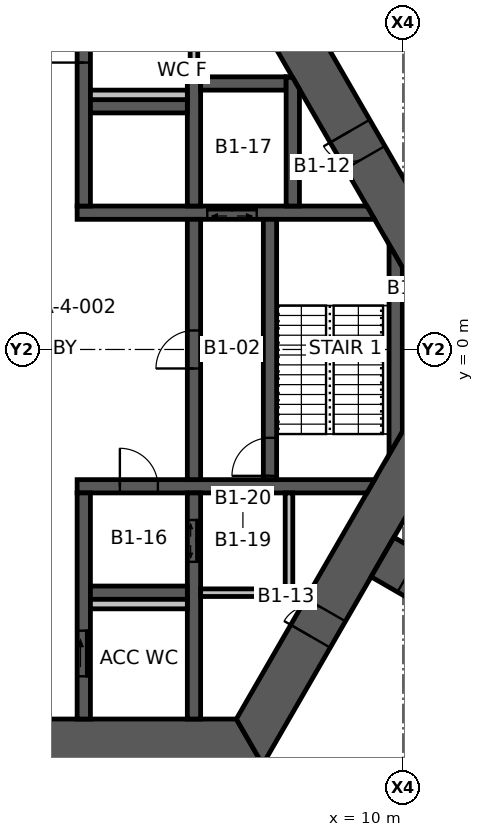
"""IFC4 building model, lengths in metres.
Left out: names, types, materials, properties, quantities, classifications, styles, units other than length and angle.
Written with IfcOpenShell. Run it as: python <this file> out.ifc"""

import sys

from ifc_helpers import new_model, si_unit, direction, frame, frame_2d, origin, place, context, subcontext, project, spatial, polyline, rectangle, outline, extrude, element, fill, save


model = new_model("IFC4")
c1 = context("Model", 3, precision=1e-05, world=origin(), true_north=direction((0.0, 1.0)))
c2 = subcontext(c1, "Body", "Model", "MODEL_VIEW")
j1 = project(units=[si_unit("LENGTHUNIT", "METRE"), si_unit("PLANEANGLEUNIT", "RADIAN")], contexts=[c1])
p1 = place(None, origin())
s1 = spatial("IfcSite", under=j1, at=p1, CompositionType="ELEMENT")
p2 = place(p1, origin())
s2 = spatial("IfcBuilding", under=s1, at=p2, CompositionType="ELEMENT")
p3 = place(p2, frame((0.0, 0.0, -5.0)))
s3 = spatial("IfcBuildingStorey", under=s2, at=p3, CompositionType="ELEMENT", Elevation=-5.0)
p4 = place(p3, frame((11.922, 0.0, 0.0), z_axis=(0.0, 0.0, 1.0), x_axis=(-0.500004296715, 0.866022923061, 0.0)))
e1 = element("IfcWall", 1, at=p4, inside=s3, PredefinedType="SHEAR", context=c2, shape_type="SweptSolid", body=[
    extrude(outline(polyline([(-0.346, -0.6), (5.835, -0.6), (6.635, -0.6), (12.269, -0.6), (11.576, 0.6), (6.635, 0.6), (5.835, 0.6), (0.346, 0.6), (-0.346, -0.6)])), origin(), (0.0, 0.0, 1.0), 5.0),
])
p5 = place(p4, frame((5.835, 0.0, 0.0)))
e2 = element("IfcOpeningElement", 2, at=p5, cuts=e1, PredefinedType="OPENING", context=c2, shape_type="SweptSolid", body=[
    extrude(rectangle(XDim=0.8, YDim=2.1, at=frame_2d((0.4, 1.05))), frame((0.0, 0.61, 0.0), z_axis=(0.0, -1.0, 0.0), x_axis=(1.0, 0.0, 0.0)), (0.0, 0.0, 1.0), 1.22),
])
p6 = place(p3, frame((-5.961, -10.325, 0.0), z_axis=(0.0, 0.0, 1.0), x_axis=(1.0, 0.0, 0.0)))
e3 = element("IfcWall", 3, at=p6, inside=s3, PredefinedType="SHEAR", context=c2, shape_type="SweptSolid", body=[
    extrude(outline(polyline([(-0.346, -0.6), (5.461, -0.6), (6.461, -0.6), (12.269, -0.6), (11.576, 0.6), (6.461, 0.6), (5.461, 0.6), (0.346, 0.6), (-0.346, -0.6)])), origin(), (0.0, 0.0, 1.0), 5.0),
])
p7 = place(p6, frame((5.461, 0.0, 0.0)))
e4 = element("IfcOpeningElement", 4, at=p7, cuts=e3, PredefinedType="OPENING", context=c2, shape_type="SweptSolid", body=[
    extrude(rectangle(XDim=1.0, YDim=2.1, at=frame_2d((0.5, 1.05))), frame((0.0, 0.61, 0.0), z_axis=(0.0, -1.0, 0.0), x_axis=(1.0, 0.0, 0.0)), (0.0, 0.0, 1.0), 1.22),
])
p8 = place(p3, frame((5.961, -10.325, 0.0), z_axis=(0.0, 0.0, 1.0), x_axis=(0.500004296715, 0.866022923061, 0.0)))
e5 = element("IfcWall", 5, at=p8, inside=s3, PredefinedType="SHEAR", context=c2, shape_type="SweptSolid", body=[
    extrude(outline(polyline([(-0.346, -0.6), (3.208, -0.6), (4.009, -0.6), (12.269, -0.6), (11.576, 0.6), (4.009, 0.6), (3.208, 0.6), (0.346, 0.6), (-0.346, -0.6)])), origin(), (0.0, 0.0, 1.0), 5.0),
])
p9 = place(p8, frame((3.208, 0.0, 0.0)))
e6 = element("IfcOpeningElement", 6, at=p9, cuts=e5, PredefinedType="OPENING", context=c2, shape_type="SweptSolid", body=[
    extrude(rectangle(XDim=0.8, YDim=2.1, at=frame_2d((0.4, 1.05))), frame((0.0, 0.61, 0.0), z_axis=(0.0, -1.0, 0.0), x_axis=(1.0, 0.0, 0.0)), (0.0, 0.0, 1.0), 1.22),
])
p10 = place(p3, frame((9.461, -5.462, 0.0), z_axis=(0.0, 0.0, 1.0), x_axis=(0.866019116917, -0.500010889016, 0.0)))
e7 = element("IfcWall", 7, at=p10, inside=s3, PredefinedType="SHEAR", context=c2, shape_type="SweptSolid", body=[
    extrude(rectangle(XDim=7.595, YDim=1.2, at=frame_2d((3.798, 0.0))), origin(), (0.0, 0.0, 1.0), 5.0),
])
p11 = place(p10, frame((0.8, 0.0, 0.0)))
e8 = element("IfcOpeningElement", 8, at=p11, cuts=e7, PredefinedType="OPENING", context=c2, shape_type="SweptSolid", body=[
    extrude(rectangle(XDim=1.0, YDim=2.1, at=frame_2d((0.5, 1.05))), frame((0.0, 0.61, 0.0), z_axis=(0.0, -1.0, 0.0), x_axis=(1.0, 0.0, 0.0)), (0.0, 0.0, 1.0), 1.22),
])
p12 = place(p3, frame((1.425, 3.6, 0.0), z_axis=(0.0, 0.0, 1.0), x_axis=(1.0, 0.0, 0.0)))
e9 = element("IfcWall", 9, at=p12, inside=s3, PredefinedType="SHEAR", context=c2, shape_type="SweptSolid", body=[
    extrude(outline(polyline([(0.0, -0.175), (3.425, -0.175), (4.725, -0.175), (7.827, -0.175), (7.625, 0.175), (4.725, 0.175), (3.425, 0.175), (0.0, 0.175), (0.0, -0.175)])), origin(), (0.0, 0.0, 1.0), 5.0),
])
p13 = place(p12, frame((3.425, 0.0, 0.0)))
e10 = element("IfcOpeningElement", 10, at=p13, cuts=e9, PredefinedType="OPENING", context=c2, shape_type="SweptSolid", body=[
    extrude(rectangle(XDim=1.3, YDim=2.1, at=frame_2d((0.65, 1.05))), frame((0.0, 0.185, 0.0), z_axis=(0.0, -1.0, 0.0), x_axis=(1.0, 0.0, 0.0)), (0.0, 0.0, 1.0), 0.37),
])
p14 = place(p3, frame((1.425, -3.6, 0.0), z_axis=(0.0, 0.0, 1.0), x_axis=(1.0, 0.0, 0.0)))
e11 = element("IfcWall", 11, at=p14, inside=s3, PredefinedType="SHEAR", context=c2, shape_type="SweptSolid", body=[
    extrude(outline(polyline([(0.0, -0.175), (1.125, -0.175), (2.125, -0.175), (7.625, -0.175), (7.827, 0.175), (2.125, 0.175), (1.125, 0.175), (0.0, 0.175), (0.0, -0.175)])), origin(), (0.0, 0.0, 1.0), 5.0),
])
p15 = place(p14, frame((1.125, 0.0, 0.0)))
e12 = element("IfcOpeningElement", 12, at=p15, cuts=e11, PredefinedType="OPENING", context=c2, shape_type="SweptSolid", body=[
    extrude(rectangle(XDim=1.0, YDim=2.1, at=frame_2d((0.5, 1.05))), frame((0.0, 0.185, 0.0), z_axis=(0.0, -1.0, 0.0), x_axis=(1.0, 0.0, 0.0)), (0.0, 0.0, 1.0), 0.37),
])
p16 = place(p3, frame((1.6, 3.775, 0.0), z_axis=(0.0, 0.0, 1.0), x_axis=(0.0, 1.0, 0.0)))
e13 = element("IfcWall", 13, at=p16, inside=s3, PredefinedType="SHEAR", context=c2, shape_type="SweptSolid", body=[
    extrude(rectangle(XDim=5.95, YDim=0.35, at=frame_2d((2.975, 0.0))), origin(), (0.0, 0.0, 1.0), 5.0),
])
p17 = place(p16, frame((3.775, 0.0, 0.0)))
e14 = element("IfcOpeningElement", 14, at=p17, cuts=e13, PredefinedType="OPENING", context=c2, shape_type="SweptSolid", body=[
    extrude(rectangle(XDim=0.9, YDim=2.1, at=frame_2d((0.45, 1.05))), frame((0.0, 0.185, 0.0), z_axis=(0.0, -1.0, 0.0), x_axis=(1.0, 0.0, 0.0)), (0.0, 0.0, 1.0), 0.37),
])
p18 = place(p3, frame((1.6, -3.775, 0.0), z_axis=(0.0, 0.0, 1.0), x_axis=(0.0, -1.0, 0.0)))
e15 = element("IfcWall", 15, at=p18, inside=s3, PredefinedType="SHEAR", context=c2, shape_type="SweptSolid", body=[
    extrude(rectangle(XDim=5.95, YDim=0.35, at=frame_2d((2.975, 0.0))), origin(), (0.0, 0.0, 1.0), 5.0),
])
p19 = place(p18, frame((3.625, 0.0, 0.0)))
e16 = element("IfcOpeningElement", 16, at=p19, cuts=e15, PredefinedType="OPENING", context=c2, shape_type="SweptSolid", body=[
    extrude(rectangle(XDim=1.2, YDim=2.1, at=frame_2d((0.6, 1.05))), frame((0.0, 0.185, 0.0), z_axis=(0.0, -1.0, 0.0), x_axis=(1.0, 0.0, 0.0)), (0.0, 0.0, 1.0), 0.37),
])
p20 = place(p3, frame((4.5, -3.425, 0.0), z_axis=(0.0, 0.0, 1.0), x_axis=(0.0, 1.0, 0.0)))
e17 = element("IfcWall", 17, at=p20, inside=s3, PredefinedType="SHEAR", context=c2, shape_type="SweptSolid", body=[
    extrude(rectangle(XDim=6.85, YDim=0.35, at=frame_2d((3.425, 0.0))), origin(), (0.0, 0.0, 1.0), 5.0),
])
p21 = place(p20, frame((2.925, 0.0, 0.0)))
e18 = element("IfcOpeningElement", 18, at=p21, cuts=e17, PredefinedType="OPENING", context=c2, shape_type="SweptSolid", body=[
    extrude(rectangle(XDim=1.0, YDim=2.1, at=frame_2d((0.5, 1.05))), frame((0.0, 0.185, 0.0), z_axis=(0.0, -1.0, 0.0), x_axis=(1.0, 0.0, 0.0)), (0.0, 0.0, 1.0), 0.37),
])
p22 = place(p3, frame((6.5, -3.425, 0.0), z_axis=(0.0, 0.0, 1.0), x_axis=(0.0, 1.0, 0.0)))
e19 = element("IfcWall", 19, at=p22, inside=s3, PredefinedType="SHEAR", context=c2, shape_type="SweptSolid", body=[
    extrude(rectangle(XDim=6.85, YDim=0.35, at=frame_2d((3.425, 0.0))), origin(), (0.0, 0.0, 1.0), 5.0),
])
p23 = place(p22, frame((0.1, 0.0, 0.0)))
e20 = element("IfcOpeningElement", 20, at=p23, cuts=e19, PredefinedType="OPENING", context=c2, shape_type="SweptSolid", body=[
    extrude(rectangle(XDim=1.0, YDim=2.1, at=frame_2d((0.5, 1.05))), frame((0.0, 0.185, 0.0), z_axis=(0.0, -1.0, 0.0), x_axis=(1.0, 0.0, 0.0)), (0.0, 0.0, 1.0), 0.37),
])
p24 = place(p3, frame((4.5, 3.775, 0.0), z_axis=(0.0, 0.0, 1.0), x_axis=(0.0, 1.0, 0.0)))
e21 = element("IfcWall", 21, at=p24, inside=s3, PredefinedType="SHEAR", context=c2, shape_type="SweptSolid", body=[
    extrude(rectangle(XDim=3.4, YDim=0.35, at=frame_2d((1.7, 0.0))), origin(), (0.0, 0.0, 1.0), 5.0),
])
p25 = place(p3, frame((4.5, -3.775, 0.0), z_axis=(0.0, 0.0, 1.0), x_axis=(0.0, -1.0, 0.0)))
e22 = element("IfcWall", 22, at=p25, inside=s3, PredefinedType="SHEAR", context=c2, shape_type="SweptSolid", body=[
    extrude(rectangle(XDim=5.95, YDim=0.35, at=frame_2d((2.975, 0.0))), origin(), (0.0, 0.0, 1.0), 5.0),
])
p26 = place(p25, frame((0.712, 0.0, 0.0)))
e23 = element("IfcOpeningElement", 23, at=p26, cuts=e22, PredefinedType="OPENING", context=c2, shape_type="SweptSolid", body=[
    extrude(rectangle(XDim=1.1, YDim=2.1, at=frame_2d((0.55, 1.05))), frame((0.0, 0.185, 0.0), z_axis=(0.0, -1.0, 0.0), x_axis=(1.0, 0.0, 0.0)), (0.0, 0.0, 1.0), 0.37),
])
for number, where, z_axis, x_axis in (
    (24, (1.775, 6.4, 0.0), (0.0, 0.0, 1.0), (1.0, 0.0, 0.0)),
    (25, (1.775, -6.4, 0.0), (0.0, 0.0, 1.0), (1.0, 0.0, 0.0)),
):
    element("IfcWall", number, at=place(p3, frame(where, z_axis=z_axis, x_axis=x_axis)), inside=s3, PredefinedType="SHEAR", context=c2, shape_type="SweptSolid", body=[
        extrude(rectangle(XDim=2.55, YDim=0.35, at=frame_2d((1.275, 0.0))), origin(), (0.0, 0.0, 1.0), 5.0),
    ])
p27 = place(p3, frame((4.675, 7.0, 0.0), z_axis=(0.0, 0.0, 1.0), x_axis=(1.0, 0.0, 0.0)))
e26 = element("IfcWall", 26, at=p27, inside=s3, PredefinedType="SHEAR", context=c2, shape_type="SweptSolid", body=[
    extrude(rectangle(XDim=2.25, YDim=0.35, at=frame_2d((1.125, 0.0))), origin(), (0.0, 0.0, 1.0), 5.0),
])
p28 = place(p3, frame((7.1, 3.775, 0.0), z_axis=(0.0, 0.0, 1.0), x_axis=(0.0, 1.0, 0.0)))
e27 = element("IfcWall", 27, at=p28, inside=s3, PredefinedType="SHEAR", context=c2, shape_type="SweptSolid", body=[
    extrude(outline(polyline([(0.0, -0.175), (3.074, -0.175), (3.377, 0.0), (3.4, 0.175), (0.0, 0.175), (0.0, -0.175)])), origin(), (0.0, 0.0, 1.0), 5.0),
])
p29 = place(p3, frame((9.808, -2.462, 0.0), z_axis=(0.0, 0.0, 1.0), x_axis=(0.0, 1.0, 0.0)))
e28 = element("IfcWall", 28, at=p29, inside=s3, PredefinedType="SHEAR", context=c2, shape_type="SweptSolid", body=[
    extrude(outline(polyline([(0.303, -0.175), (4.621, -0.175), (5.228, 0.175), (-0.303, 0.175), (0.303, -0.175)])), origin(), (0.0, 0.0, 1.0), 5.0),
])
p30 = place(p3, frame((4.5, 7.175, 0.0), z_axis=(0.0, 0.0, 1.0), x_axis=(0.0, 1.0, 0.0)))
e29 = element("IfcWall", 29, at=p30, inside=s3, PredefinedType="STANDARD", context=c2, shape_type="SweptSolid", body=[
    extrude(rectangle(XDim=2.55, YDim=0.2, at=frame_2d((1.275, 0.0))), origin(), (0.0, 0.0, 1.0), 5.0),
])
p31 = place(p3, frame((4.675, -6.4, 0.0), z_axis=(0.0, 0.0, 1.0), x_axis=(1.0, 0.0, 0.0)))
e30 = element("IfcWall", 30, at=p31, inside=s3, PredefinedType="STANDARD", context=c2, shape_type="SweptSolid", body=[
    extrude(rectangle(XDim=2.425, YDim=0.2, at=frame_2d((1.212, 0.0))), origin(), (0.0, 0.0, 1.0), 5.0),
])
p32 = place(p3, frame((7.0, -3.775, 0.0), z_axis=(0.0, 0.0, 1.0), x_axis=(0.0, -1.0, 0.0)))
e31 = element("IfcWall", 31, at=p32, inside=s3, PredefinedType="STANDARD", context=c2, shape_type="SweptSolid", body=[
    extrude(rectangle(XDim=2.525, YDim=0.2, at=frame_2d((1.263, 0.0))), origin(), (0.0, 0.0, 1.0), 5.0),
])
for number, where, z_axis, x_axis in (
    (32, (1.775, 6.7, 0.0), (0.0, 0.0, 1.0), (1.0, 0.0, 0.0)),
    (33, (1.775, -6.7, 0.0), (0.0, 0.0, 1.0), (1.0, 0.0, 0.0)),
):
    element("IfcWall", number, at=place(p3, frame(where, z_axis=z_axis, x_axis=x_axis)), inside=s3, PredefinedType="PLUMBINGWALL", context=c2, shape_type="SweptSolid", body=[
        extrude(rectangle(XDim=2.55, YDim=0.25, at=frame_2d((1.275, 0.0))), origin(), (0.0, 0.0, 1.0), 5.0),
    ])
p33 = place(p5, origin())
e34 = element("IfcDoor", 34, at=p33, inside=s3, OperationType="SINGLE_SWING_RIGHT", PredefinedType="DOOR", context=c2, shape_type="SweptSolid", body=[
    extrude(rectangle(XDim=0.8, YDim=2.1, at=frame_2d((0.4, 1.05))), frame((0.0, 0.025, 0.0), z_axis=(0.0, -1.0, 0.0), x_axis=(1.0, 0.0, 0.0)), (0.0, 0.0, 1.0), 0.05),
])
fill(e2, e34)
p34 = place(p9, origin())
e35 = element("IfcDoor", 35, at=p34, inside=s3, OperationType="SINGLE_SWING_LEFT", PredefinedType="DOOR", context=c2, shape_type="SweptSolid", body=[
    extrude(rectangle(XDim=0.8, YDim=2.1, at=frame_2d((0.4, 1.05))), frame((0.0, 0.025, 0.0), z_axis=(0.0, -1.0, 0.0), x_axis=(1.0, 0.0, 0.0)), (0.0, 0.0, 1.0), 0.05),
])
fill(e6, e35)
p35 = place(p21, origin())
e36 = element("IfcDoor", 36, at=p35, inside=s3, OperationType="SINGLE_SWING_LEFT", PredefinedType="DOOR", context=c2, shape_type="SweptSolid", body=[
    extrude(rectangle(XDim=1.0, YDim=2.1, at=frame_2d((0.5, 1.05))), frame((0.0, 0.025, 0.0), z_axis=(0.0, -1.0, 0.0), x_axis=(1.0, 0.0, 0.0)), (0.0, 0.0, 1.0), 0.05),
])
fill(e18, e36)
p36 = place(p23, origin())
e37 = element("IfcDoor", 37, at=p36, inside=s3, OperationType="SINGLE_SWING_LEFT", PredefinedType="DOOR", context=c2, shape_type="SweptSolid", body=[
    extrude(rectangle(XDim=1.0, YDim=2.1, at=frame_2d((0.5, 1.05))), frame((0.0, 0.025, 0.0), z_axis=(0.0, -1.0, 0.0), x_axis=(1.0, 0.0, 0.0)), (0.0, 0.0, 1.0), 0.05),
])
fill(e20, e37)
p37 = place(p17, origin())
e38 = element("IfcDoor", 38, at=p37, inside=s3, OperationType="SINGLE_SWING_LEFT", PredefinedType="DOOR", context=c2, shape_type="SweptSolid", body=[
    extrude(rectangle(XDim=0.9, YDim=2.1, at=frame_2d((0.45, 1.05))), frame((0.0, 0.025, 0.0), z_axis=(0.0, -1.0, 0.0), x_axis=(1.0, 0.0, 0.0)), (0.0, 0.0, 1.0), 0.05),
])
fill(e14, e38)
p38 = place(p19, origin())
e39 = element("IfcDoor", 39, at=p38, inside=s3, OperationType="SLIDING_TO_LEFT", PredefinedType="DOOR", context=c2, shape_type="SweptSolid", body=[
    extrude(rectangle(XDim=1.2, YDim=2.1, at=frame_2d((0.6, 1.05))), frame((0.0, 0.025, 0.0), z_axis=(0.0, -1.0, 0.0), x_axis=(1.0, 0.0, 0.0)), (0.0, 0.0, 1.0), 0.05),
])
fill(e16, e39)
p39 = place(p15, origin())
e40 = element("IfcDoor", 40, at=p39, inside=s3, OperationType="SINGLE_SWING_LEFT", PredefinedType="DOOR", context=c2, shape_type="SweptSolid", body=[
    extrude(rectangle(XDim=1.0, YDim=2.1, at=frame_2d((0.5, 1.05))), frame((0.0, 0.025, 0.0), z_axis=(0.0, -1.0, 0.0), x_axis=(1.0, 0.0, 0.0)), (0.0, 0.0, 1.0), 0.05),
])
fill(e12, e40)
p40 = place(p26, origin())
e41 = element("IfcDoor", 41, at=p40, inside=s3, OperationType="DOUBLE_DOOR_SLIDING", PredefinedType="DOOR", context=c2, shape_type="SweptSolid", body=[
    extrude(rectangle(XDim=1.1, YDim=2.1, at=frame_2d((0.55, 1.05))), frame((0.0, 0.025, 0.0), z_axis=(0.0, -1.0, 0.0), x_axis=(1.0, 0.0, 0.0)), (0.0, 0.0, 1.0), 0.05),
])
fill(e23, e41)
p41 = place(p13, origin())
e42 = element("IfcDoor", 42, at=p41, inside=s3, OperationType="DOUBLE_DOOR_SLIDING", PredefinedType="DOOR", context=c2, shape_type="SweptSolid", body=[
    extrude(rectangle(XDim=1.3, YDim=2.1, at=frame_2d((0.65, 1.05))), frame((0.0, 0.025, 0.0), z_axis=(0.0, -1.0, 0.0), x_axis=(1.0, 0.0, 0.0)), (0.0, 0.0, 1.0), 0.05),
])
fill(e10, e42)
save(model, sys.argv[1])
